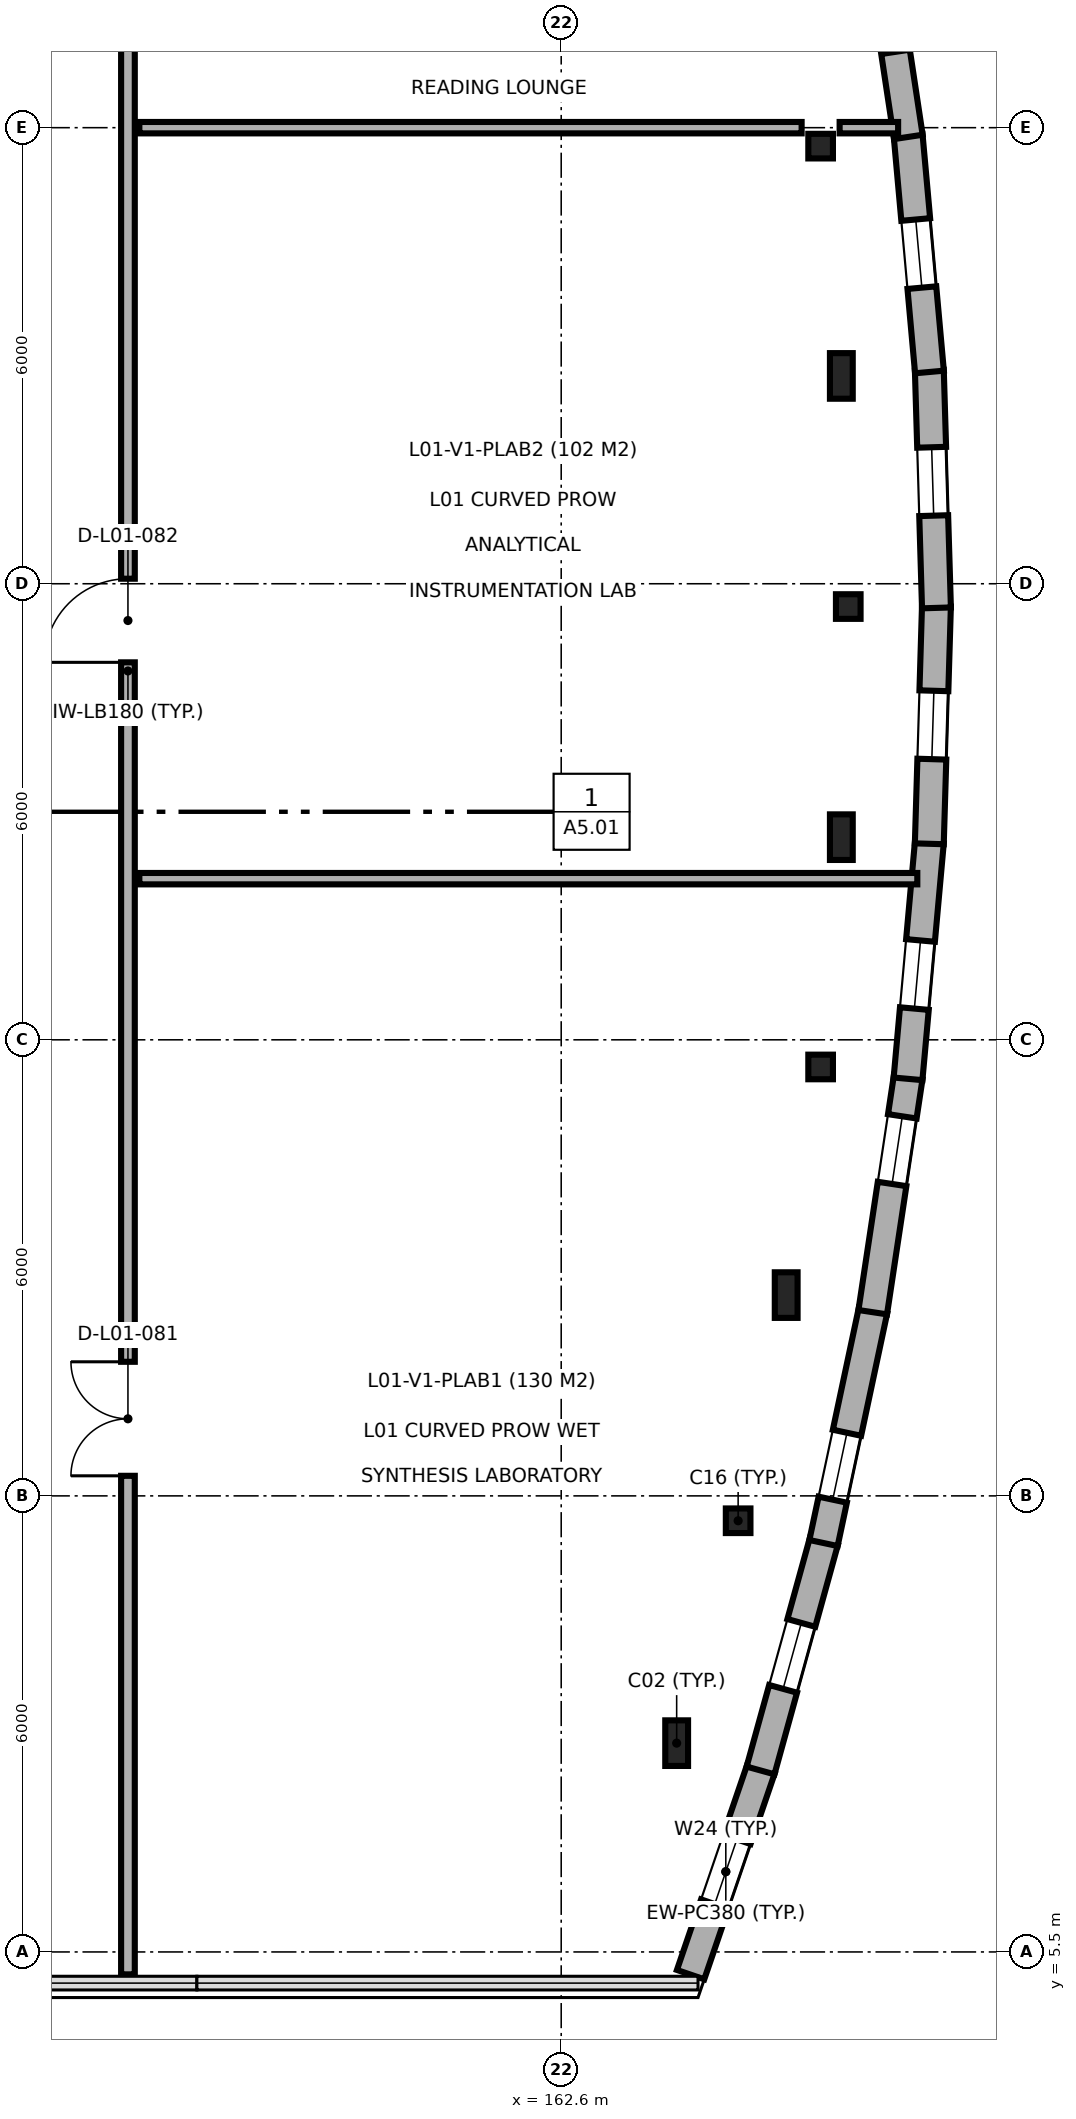
"""IFC4 building model, lengths in metres.
Left out: names, types, materials, properties, quantities, classifications, styles, units other than length and angle.
Written with IfcOpenShell. Run it as: python <this file> out.ifc"""

import sys

from ifc_helpers import new_model, si_unit, direction, frame, frame_2d, origin, origin_2d, place, context, subcontext, project, spatial, rectangle, hollow_circle, i_section, extrude, element, fill, save


model = new_model("IFC4")
c1 = context("Model", 3, precision=1e-05, world=origin(), true_north=direction((0.0, 1.0)))
c2 = subcontext(c1, "Body", "Model", "MODEL_VIEW")
j1 = project(units=[si_unit("LENGTHUNIT", "METRE"), si_unit("PLANEANGLEUNIT", "RADIAN")], contexts=[c1])
p1 = place(None, origin())
s1 = spatial("IfcSite", under=j1, at=p1, CompositionType="ELEMENT")
p2 = place(p1, origin())
s2 = spatial("IfcBuilding", under=s1, at=p2, CompositionType="ELEMENT")
p3 = place(p2, frame((0.0, 0.0, 4.8)))
s3 = spatial("IfcBuildingStorey", under=s2, at=p3, CompositionType="ELEMENT", Elevation=4.8)
p4 = place(p3, frame((164.119, 8.247, 0.0), z_axis=(0.0, 0.0, 1.0), x_axis=(1.0, 0.0, 0.0)))
e1 = element("IfcColumn", 1, at=p4, inside=s3, PredefinedType="COLUMN", context=c2, shape_type="SweptSolid", body=[
    extrude(i_section(OverallWidth=0.3, OverallDepth=0.6, WebThickness=0.015, FlangeThickness=0.03, FilletRadius=0.027, at=origin_2d()), origin(), (0.0, 0.0, 1.0), 4.5),
])
p5 = place(p3, frame((164.928, 11.173, 0.0), z_axis=(0.0, 0.0, 1.0), x_axis=(1.0, 0.0, 0.0)))
e2 = element("IfcColumn", 2, at=p5, inside=s3, PredefinedType="COLUMN", context=c2, shape_type="SweptSolid", body=[
    extrude(hollow_circle(Radius=0.162, WallThickness=0.016, at=origin_2d()), origin(), (0.0, 0.0, 1.0), 4.5),
])
p6 = place(p3, frame((165.56, 14.142, 0.0), z_axis=(0.0, 0.0, 1.0), x_axis=(1.0, 0.0, 0.0)))
e3 = element("IfcColumn", 3, at=p6, inside=s3, PredefinedType="COLUMN", context=c2, shape_type="SweptSolid", body=[
    extrude(i_section(OverallWidth=0.3, OverallDepth=0.6, WebThickness=0.015, FlangeThickness=0.03, FilletRadius=0.027, at=origin_2d()), origin(), (0.0, 0.0, 1.0), 4.5),
])
for number, where, z_axis, x_axis in (
    (4, (166.013, 17.143, 0.0), (0.0, 0.0, 1.0), (1.0, 0.0, 0.0)),
    (5, (166.013, 29.257, 0.0), (0.0, 0.0, 1.0), (1.0, 0.0, 0.0)),
):
    element("IfcColumn", number, at=place(p3, frame(where, z_axis=z_axis, x_axis=x_axis)), inside=s3, PredefinedType="COLUMN", context=c2, shape_type="SweptSolid", body=[
        extrude(hollow_circle(Radius=0.162, WallThickness=0.016, at=origin_2d()), origin(), (0.0, 0.0, 1.0), 4.5),
    ])
for number, where, z_axis, x_axis in (
    (6, (166.285, 20.166, 0.0), (0.0, 0.0, 1.0), (1.0, 0.0, 0.0)),
    (7, (166.285, 26.234, 0.0), (0.0, 0.0, 1.0), (1.0, 0.0, 0.0)),
):
    element("IfcColumn", number, at=place(p3, frame(where, z_axis=z_axis, x_axis=x_axis)), inside=s3, PredefinedType="COLUMN", context=c2, shape_type="SweptSolid", body=[
        extrude(i_section(OverallWidth=0.3, OverallDepth=0.6, WebThickness=0.015, FlangeThickness=0.03, FilletRadius=0.027, at=origin_2d()), origin(), (0.0, 0.0, 1.0), 4.5),
    ])
p7 = place(p3, frame((166.376, 23.2, 0.0), z_axis=(0.0, 0.0, 1.0), x_axis=(1.0, 0.0, 0.0)))
e8 = element("IfcColumn", 8, at=p7, inside=s3, PredefinedType="COLUMN", context=c2, shape_type="SweptSolid", body=[
    extrude(hollow_circle(Radius=0.162, WallThickness=0.016, at=origin_2d()), origin(), (0.0, 0.0, 1.0), 4.5),
])
p8 = place(p3, frame((164.302, 5.201, 0.0), z_axis=(0.0, 0.0, 1.0), x_axis=(0.323739917301, 0.946146112366, 0.0)))
e9 = element("IfcWall", 9, at=p8, inside=s3, PredefinedType="SOLIDWALL", context=c2, shape_type="SweptSolid", body=[
    extrude(rectangle(XDim=2.863, YDim=0.38, at=frame_2d((1.431, 0.0))), origin(), (0.0, 0.0, 1.0), 4.25),
])
p9 = place(p8, frame((0.981, 0.0, 0.9)))
e10 = element("IfcOpeningElement", 10, at=p9, cuts=e9, PredefinedType="OPENING", context=c2, shape_type="SweptSolid", body=[
    extrude(rectangle(XDim=0.9, YDim=1.8, at=frame_2d((0.45, 0.9))), frame((0.0, 0.2, 0.0), z_axis=(0.0, -1.0, 0.0), x_axis=(1.0, 0.0, 0.0)), (0.0, 0.0, 1.0), 0.4),
])
p10 = place(p3, frame((165.222, 7.888, 0.0), z_axis=(0.0, 0.0, 1.0), x_axis=(0.266536691105, 0.963824772609, 0.0)))
e11 = element("IfcWall", 11, at=p10, inside=s3, PredefinedType="SOLIDWALL", context=c2, shape_type="SweptSolid", body=[
    extrude(rectangle(XDim=3.128, YDim=0.38, at=frame_2d((1.564, 0.0))), origin(), (0.0, 0.0, 1.0), 4.25),
])
p11 = place(p10, frame((1.114, 0.0, 0.9)))
e12 = element("IfcOpeningElement", 12, at=p11, cuts=e11, PredefinedType="OPENING", context=c2, shape_type="SweptSolid", body=[
    extrude(rectangle(XDim=0.9, YDim=1.8, at=frame_2d((0.45, 0.9))), frame((0.0, 0.2, 0.0), z_axis=(0.0, -1.0, 0.0), x_axis=(1.0, 0.0, 0.0)), (0.0, 0.0, 1.0), 0.4),
])
p12 = place(p3, frame((166.051, 10.88, 0.0), z_axis=(0.0, 0.0, 1.0), x_axis=(0.208287141705, 0.978067720866, 0.0)))
e13 = element("IfcWall", 13, at=p12, inside=s3, PredefinedType="SOLIDWALL", context=c2, shape_type="SweptSolid", body=[
    extrude(rectangle(XDim=3.128, YDim=0.38, at=frame_2d((1.564, 0.0))), origin(), (0.0, 0.0, 1.0), 4.25),
])
p13 = place(p12, frame((0.583, 0.0, 0.9)))
e14 = element("IfcOpeningElement", 14, at=p13, cuts=e13, PredefinedType="OPENING", context=c2, shape_type="SweptSolid", body=[
    extrude(rectangle(XDim=0.9, YDim=1.8, at=frame_2d((0.45, 0.9))), frame((0.0, 0.2, 0.0), z_axis=(0.0, -1.0, 0.0), x_axis=(1.0, 0.0, 0.0)), (0.0, 0.0, 1.0), 0.4),
])
p14 = place(p3, frame((166.698, 13.917, 0.0), z_axis=(0.0, 0.0, 1.0), x_axis=(0.149218139282, 0.988804301624, 0.0)))
e15 = element("IfcWall", 15, at=p14, inside=s3, PredefinedType="SOLIDWALL", context=c2, shape_type="SweptSolid", body=[
    extrude(rectangle(XDim=3.128, YDim=0.38, at=frame_2d((1.564, 0.0))), origin(), (0.0, 0.0, 1.0), 4.25),
])
p15 = place(p14, frame((1.706, 0.0, 0.9)))
e16 = element("IfcOpeningElement", 16, at=p15, cuts=e15, PredefinedType="OPENING", context=c2, shape_type="SweptSolid", body=[
    extrude(rectangle(XDim=0.9, YDim=1.8, at=frame_2d((0.45, 0.9))), frame((0.0, 0.2, 0.0), z_axis=(0.0, -1.0, 0.0), x_axis=(1.0, 0.0, 0.0)), (0.0, 0.0, 1.0), 0.4),
])
p16 = place(p3, frame((167.163, 16.987, 0.0), z_axis=(0.0, 0.0, 1.0), x_axis=(0.089747627339, 0.995964539222, 0.0)))
e17 = element("IfcWall", 17, at=p16, inside=s3, PredefinedType="SOLIDWALL", context=c2, shape_type="SweptSolid", body=[
    extrude(rectangle(XDim=3.128, YDim=0.38, at=frame_2d((1.564, 0.0))), origin(), (0.0, 0.0, 1.0), 4.25),
])
p17 = place(p16, frame((0.928, 0.0, 0.9)))
e18 = element("IfcOpeningElement", 18, at=p17, cuts=e17, PredefinedType="OPENING", context=c2, shape_type="SweptSolid", body=[
    extrude(rectangle(XDim=0.9, YDim=1.8, at=frame_2d((0.45, 0.9))), frame((0.0, 0.2, 0.0), z_axis=(0.0, -1.0, 0.0), x_axis=(1.0, 0.0, 0.0)), (0.0, 0.0, 1.0), 0.4),
])
p18 = place(p3, frame((167.443, 20.079, 0.0), z_axis=(0.0, 0.0, 1.0), x_axis=(0.02996779607, 0.999550864738, 0.0)))
e19 = element("IfcWall", 19, at=p18, inside=s3, PredefinedType="SOLIDWALL", context=c2, shape_type="SweptSolid", body=[
    extrude(rectangle(XDim=3.128, YDim=0.38, at=frame_2d((1.564, 0.0))), origin(), (0.0, 0.0, 1.0), 4.25),
])
p19 = place(p18, frame((1.114, 0.0, 0.9)))
e20 = element("IfcOpeningElement", 20, at=p19, cuts=e19, PredefinedType="OPENING", context=c2, shape_type="SweptSolid", body=[
    extrude(rectangle(XDim=0.9, YDim=1.8, at=frame_2d((0.45, 0.9))), frame((0.0, 0.2, 0.0), z_axis=(0.0, -1.0, 0.0), x_axis=(1.0, 0.0, 0.0)), (0.0, 0.0, 1.0), 0.4),
])
p20 = place(p3, frame((167.537, 23.182, 0.0), z_axis=(0.0, 0.0, 1.0), x_axis=(-0.029970133922, 0.999550794644, 0.0)))
e21 = element("IfcWall", 21, at=p20, inside=s3, PredefinedType="SOLIDWALL", context=c2, shape_type="SweptSolid", body=[
    extrude(rectangle(XDim=3.128, YDim=0.38, at=frame_2d((1.564, 0.0))), origin(), (0.0, 0.0, 1.0), 4.25),
])
p21 = place(p20, frame((1.214, 0.0, 0.9)))
e22 = element("IfcOpeningElement", 22, at=p21, cuts=e21, PredefinedType="OPENING", context=c2, shape_type="SweptSolid", body=[
    extrude(rectangle(XDim=0.9, YDim=1.8, at=frame_2d((0.45, 0.9))), frame((0.0, 0.2, 0.0), z_axis=(0.0, -1.0, 0.0), x_axis=(1.0, 0.0, 0.0)), (0.0, 0.0, 1.0), 0.4),
])
p22 = place(p3, frame((167.445, 26.286, 0.0), z_axis=(0.0, 0.0, 1.0), x_axis=(-0.089747627339, 0.995964539222, 0.0)))
e23 = element("IfcWall", 23, at=p22, inside=s3, PredefinedType="SOLIDWALL", context=c2, shape_type="SweptSolid", body=[
    extrude(rectangle(XDim=3.128, YDim=0.38, at=frame_2d((1.564, 0.0))), origin(), (0.0, 0.0, 1.0), 4.25),
])
p23 = place(p22, frame((1.114, 0.0, 0.9)))
e24 = element("IfcOpeningElement", 24, at=p23, cuts=e23, PredefinedType="OPENING", context=c2, shape_type="SweptSolid", body=[
    extrude(rectangle(XDim=0.9, YDim=1.8, at=frame_2d((0.45, 0.9))), frame((0.0, 0.2, 0.0), z_axis=(0.0, -1.0, 0.0), x_axis=(1.0, 0.0, 0.0)), (0.0, 0.0, 1.0), 0.4),
])
p24 = place(p3, frame((167.167, 29.378, 0.0), z_axis=(0.0, 0.0, 1.0), x_axis=(-0.149305964746, 0.988791044099, 0.0)))
e25 = element("IfcWall", 25, at=p24, inside=s3, PredefinedType="SOLIDWALL", context=c2, shape_type="SweptSolid", body=[
    extrude(rectangle(XDim=3.128, YDim=0.38, at=frame_2d((1.564, 0.0))), origin(), (0.0, 0.0, 1.0), 4.25),
])
p25 = place(p24, frame((1.132, 0.0, 0.9)))
e26 = element("IfcOpeningElement", 26, at=p25, cuts=e25, PredefinedType="OPENING", context=c2, shape_type="SweptSolid", body=[
    extrude(rectangle(XDim=0.9, YDim=1.8, at=frame_2d((0.45, 0.9))), frame((0.0, 0.2, 0.0), z_axis=(0.0, -1.0, 0.0), x_axis=(1.0, 0.0, 0.0)), (0.0, 0.0, 1.0), 0.4),
])
p26 = place(p3, frame((156.9, 5.205, 0.0), z_axis=(0.0, 0.0, 1.0), x_axis=(0.0, 1.0, 0.0)))
e27 = element("IfcWall", 27, at=p26, inside=s3, PredefinedType="PARTITIONING", context=c2, shape_type="SweptSolid", body=[
    extrude(rectangle(XDim=34.295, YDim=0.18, at=frame_2d((17.147, 0.0))), origin(), (0.0, 0.0, 1.0), 4.25),
])
p27 = place(p26, frame((6.559, 0.0, 0.0)))
e28 = element("IfcOpeningElement", 28, at=p27, cuts=e27, PredefinedType="OPENING", context=c2, shape_type="SweptSolid", body=[
    extrude(rectangle(XDim=1.5, YDim=2.2, at=frame_2d((0.75, 1.1))), frame((0.0, 0.1, 0.0), z_axis=(0.0, -1.0, 0.0), x_axis=(1.0, 0.0, 0.0)), (0.0, 0.0, 1.0), 0.2),
])
p28 = place(p26, frame((17.261, 0.0, 0.0)))
e29 = element("IfcOpeningElement", 29, at=p28, cuts=e27, PredefinedType="OPENING", context=c2, shape_type="SweptSolid", body=[
    extrude(rectangle(XDim=1.1, YDim=2.15, at=frame_2d((0.55, 1.075))), frame((0.0, 0.1, 0.0), z_axis=(0.0, -1.0, 0.0), x_axis=(1.0, 0.0, 0.0)), (0.0, 0.0, 1.0), 0.2),
])
p29 = place(p26, frame((27.343, 0.0, 0.0)))
e30 = element("IfcOpeningElement", 30, at=p29, cuts=e27, PredefinedType="OPENING", context=c2, shape_type="SweptSolid", body=[
    extrude(rectangle(XDim=0.95, YDim=2.1, at=frame_2d((0.475, 1.05))), frame((0.0, 0.1, 0.0), z_axis=(0.0, -1.0, 0.0), x_axis=(1.0, 0.0, 0.0)), (0.0, 0.0, 1.0), 0.2),
])
p30 = place(p3, frame((157.05, 19.62, 0.0), z_axis=(0.0, 0.0, 1.0), x_axis=(1.0, 0.0, 0.0)))
e31 = element("IfcWall", 31, at=p30, inside=s3, PredefinedType="PARTITIONING", context=c2, shape_type="SweptSolid", body=[
    extrude(rectangle(XDim=10.235, YDim=0.15, at=frame_2d((5.117, 0.0))), origin(), (0.0, 0.0, 1.0), 3.75),
])
p31 = place(p3, frame((157.05, 29.5, 0.0), z_axis=(0.0, 0.0, 1.0), x_axis=(1.0, 0.0, 0.0)))
e32 = element("IfcWall", 32, at=p31, inside=s3, PredefinedType="PARTITIONING", context=c2, shape_type="SweptSolid", body=[
    extrude(rectangle(XDim=8.713, YDim=0.15, at=frame_2d((4.356, 0.0))), origin(), (0.0, 0.0, 1.0), 3.75),
])
p32 = place(p3, frame((166.263, 29.5, 0.0), z_axis=(0.0, 0.0, 1.0), x_axis=(1.0, 0.0, 0.0)))
e33 = element("IfcWall", 33, at=p32, inside=s3, PredefinedType="PARTITIONING", context=c2, shape_type="SweptSolid", body=[
    extrude(rectangle(XDim=0.77, YDim=0.15, at=frame_2d((0.385, 0.0))), origin(), (0.0, 0.0, 1.0), 4.25),
])
p33 = place(p9, origin())
e34 = element("IfcWindow", 34, at=p33, inside=s3, PartitioningType="SINGLE_PANEL", PredefinedType="WINDOW", context=c2, shape_type="SweptSolid", body=[
    extrude(rectangle(XDim=0.9, YDim=1.8, at=frame_2d((0.45, 0.9))), frame((0.0, 0.03, 0.0), z_axis=(0.0, -1.0, 0.0), x_axis=(1.0, 0.0, 0.0)), (0.0, 0.0, 1.0), 0.06),
])
fill(e10, e34)
p34 = place(p11, origin())
e35 = element("IfcWindow", 35, at=p34, inside=s3, PartitioningType="SINGLE_PANEL", PredefinedType="WINDOW", context=c2, shape_type="SweptSolid", body=[
    extrude(rectangle(XDim=0.9, YDim=1.8, at=frame_2d((0.45, 0.9))), frame((0.0, 0.03, 0.0), z_axis=(0.0, -1.0, 0.0), x_axis=(1.0, 0.0, 0.0)), (0.0, 0.0, 1.0), 0.06),
])
fill(e12, e35)
p35 = place(p13, origin())
e36 = element("IfcWindow", 36, at=p35, inside=s3, PartitioningType="SINGLE_PANEL", PredefinedType="WINDOW", context=c2, shape_type="SweptSolid", body=[
    extrude(rectangle(XDim=0.9, YDim=1.8, at=frame_2d((0.45, 0.9))), frame((0.0, 0.03, 0.0), z_axis=(0.0, -1.0, 0.0), x_axis=(1.0, 0.0, 0.0)), (0.0, 0.0, 1.0), 0.06),
])
fill(e14, e36)
p36 = place(p15, origin())
e37 = element("IfcWindow", 37, at=p36, inside=s3, PartitioningType="SINGLE_PANEL", PredefinedType="WINDOW", context=c2, shape_type="SweptSolid", body=[
    extrude(rectangle(XDim=0.9, YDim=1.8, at=frame_2d((0.45, 0.9))), frame((0.0, 0.03, 0.0), z_axis=(0.0, -1.0, 0.0), x_axis=(1.0, 0.0, 0.0)), (0.0, 0.0, 1.0), 0.06),
])
fill(e16, e37)
p37 = place(p17, origin())
e38 = element("IfcWindow", 38, at=p37, inside=s3, PartitioningType="SINGLE_PANEL", PredefinedType="WINDOW", context=c2, shape_type="SweptSolid", body=[
    extrude(rectangle(XDim=0.9, YDim=1.8, at=frame_2d((0.45, 0.9))), frame((0.0, 0.03, 0.0), z_axis=(0.0, -1.0, 0.0), x_axis=(1.0, 0.0, 0.0)), (0.0, 0.0, 1.0), 0.06),
])
fill(e18, e38)
p38 = place(p19, origin())
e39 = element("IfcWindow", 39, at=p38, inside=s3, PartitioningType="SINGLE_PANEL", PredefinedType="WINDOW", context=c2, shape_type="SweptSolid", body=[
    extrude(rectangle(XDim=0.9, YDim=1.8, at=frame_2d((0.45, 0.9))), frame((0.0, 0.03, 0.0), z_axis=(0.0, -1.0, 0.0), x_axis=(1.0, 0.0, 0.0)), (0.0, 0.0, 1.0), 0.06),
])
fill(e20, e39)
p39 = place(p21, origin())
e40 = element("IfcWindow", 40, at=p39, inside=s3, PartitioningType="SINGLE_PANEL", PredefinedType="WINDOW", context=c2, shape_type="SweptSolid", body=[
    extrude(rectangle(XDim=0.9, YDim=1.8, at=frame_2d((0.45, 0.9))), frame((0.0, 0.03, 0.0), z_axis=(0.0, -1.0, 0.0), x_axis=(1.0, 0.0, 0.0)), (0.0, 0.0, 1.0), 0.06),
])
fill(e22, e40)
p40 = place(p23, origin())
e41 = element("IfcWindow", 41, at=p40, inside=s3, PartitioningType="SINGLE_PANEL", PredefinedType="WINDOW", context=c2, shape_type="SweptSolid", body=[
    extrude(rectangle(XDim=0.9, YDim=1.8, at=frame_2d((0.45, 0.9))), frame((0.0, 0.03, 0.0), z_axis=(0.0, -1.0, 0.0), x_axis=(1.0, 0.0, 0.0)), (0.0, 0.0, 1.0), 0.06),
])
fill(e24, e41)
p41 = place(p25, origin())
e42 = element("IfcWindow", 42, at=p41, inside=s3, PartitioningType="SINGLE_PANEL", PredefinedType="WINDOW", context=c2, shape_type="SweptSolid", body=[
    extrude(rectangle(XDim=0.9, YDim=1.8, at=frame_2d((0.45, 0.9))), frame((0.0, 0.03, 0.0), z_axis=(0.0, -1.0, 0.0), x_axis=(1.0, 0.0, 0.0)), (0.0, 0.0, 1.0), 0.06),
])
fill(e26, e42)
p42 = place(p27, origin())
e43 = element("IfcDoor", 43, at=p42, inside=s3, OperationType="DOUBLE_DOOR_SINGLE_SWING", PredefinedType="DOOR", context=c2, shape_type="SweptSolid", body=[
    extrude(rectangle(XDim=1.5, YDim=2.2, at=frame_2d((0.75, 1.1))), frame((0.0, 0.025, 0.0), z_axis=(0.0, -1.0, 0.0), x_axis=(1.0, 0.0, 0.0)), (0.0, 0.0, 1.0), 0.05),
])
fill(e28, e43)
p43 = place(p28, origin())
e44 = element("IfcDoor", 44, at=p43, inside=s3, OperationType="SINGLE_SWING_LEFT", PredefinedType="DOOR", context=c2, shape_type="SweptSolid", body=[
    extrude(rectangle(XDim=1.1, YDim=2.15, at=frame_2d((0.55, 1.075))), frame((0.0, 0.025, 0.0), z_axis=(0.0, -1.0, 0.0), x_axis=(1.0, 0.0, 0.0)), (0.0, 0.0, 1.0), 0.05),
])
fill(e29, e44)
save(model, sys.argv[1])
